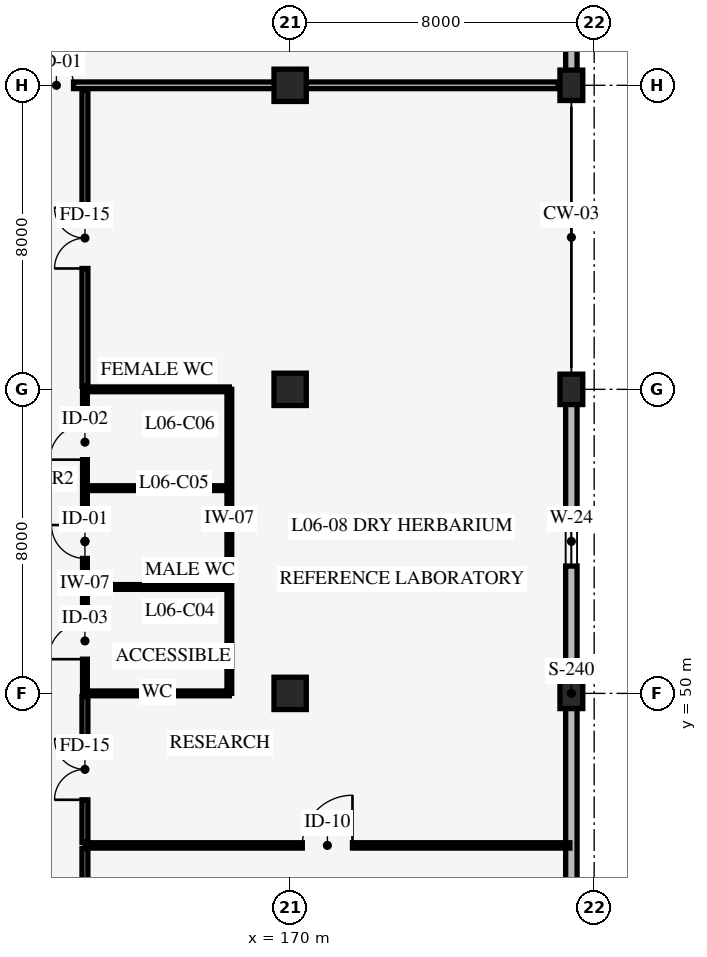
"""IFC4 building model, lengths in metres.
Left out: names, types, materials, properties, quantities, classifications, styles, units other than length and angle.
Written with IfcOpenShell. Run it as: python <this file> out.ifc"""

import sys

from ifc_helpers import new_model, si_unit, direction, frame, frame_2d, origin, origin_2d, place, context, subcontext, project, spatial, rectangle, extrude, element, fill, save


model = new_model("IFC4")
c1 = context("Model", 3, precision=1e-05, world=origin(), true_north=direction((0.0, 1.0)))
c2 = subcontext(c1, "Body", "Model", "MODEL_VIEW")
j1 = project(units=[si_unit("LENGTHUNIT", "METRE"), si_unit("PLANEANGLEUNIT", "RADIAN")], contexts=[c1])
p1 = place(None, origin())
s1 = spatial("IfcSite", under=j1, at=p1, CompositionType="ELEMENT")
p2 = place(p1, origin())
s2 = spatial("IfcBuilding", under=s1, at=p2, CompositionType="ELEMENT")
p3 = place(p2, frame((0.0, 0.0, 23.4)))
s3 = spatial("IfcBuildingStorey", under=s2, at=p3, CompositionType="ELEMENT", Elevation=23.4)
for number, where, z_axis, x_axis in (
    (1, (170.0, 50.0, 0.0), (0.0, 0.0, 1.0), (1.0, 0.0, 0.0)),
    (2, (170.0, 58.0, 0.0), (0.0, 0.0, 1.0), (1.0, 0.0, 0.0)),
    (3, (170.0, 66.0, 0.0), (0.0, 0.0, 1.0), (1.0, 0.0, 0.0)),
):
    element("IfcColumn", number, at=place(p3, frame(where, z_axis=z_axis, x_axis=x_axis)), inside=s3, PredefinedType="COLUMN", context=c2, shape_type="SweptSolid", body=[
        extrude(rectangle(XDim=0.85, YDim=0.85, at=origin_2d()), origin(), (0.0, 0.0, 1.0), 4.2),
    ])
for number, where, z_axis, x_axis in (
    (4, (177.4, 50.0, 0.0), (0.0, 0.0, 1.0), (1.0, 0.0, 0.0)),
    (5, (177.4, 58.0, 0.0), (0.0, 0.0, 1.0), (1.0, 0.0, 0.0)),
    (6, (177.4, 66.0, 0.0), (0.0, 0.0, 1.0), (1.0, 0.0, 0.0)),
):
    element("IfcColumn", number, at=place(p3, frame(where, z_axis=z_axis, x_axis=x_axis)), inside=s3, PredefinedType="COLUMN", context=c2, shape_type="SweptSolid", body=[
        extrude(rectangle(XDim=0.6, YDim=0.8, at=origin_2d()), origin(), (0.0, 0.0, 1.0), 4.2),
    ])
p4 = place(p3, frame((177.4, 74.0, 0.0), z_axis=(0.0, 0.0, 1.0), x_axis=(0.0, -1.0, 0.0)))
e7 = element("IfcWall", 7, at=p4, inside=s3, PredefinedType="STANDARD", context=c2, shape_type="SweptSolid", body=[
    extrude(rectangle(XDim=8.0, YDim=0.3, at=frame_2d((4.0, 0.0))), origin(), (0.0, 0.0, 1.0), 3.19),
])
p5 = place(p4, frame((3.15, 0.0, 0.85)))
e8 = element("IfcOpeningElement", 8, at=p5, cuts=e7, PredefinedType="OPENING", context=c2, shape_type="SweptSolid", body=[
    extrude(rectangle(XDim=1.7, YDim=1.2, at=frame_2d((0.85, 0.6))), frame((0.0, 0.16, 0.0), z_axis=(0.0, -1.0, 0.0), x_axis=(1.0, 0.0, 0.0)), (0.0, 0.0, 1.0), 0.32),
])
p6 = place(p3, frame((177.4, 58.0, 0.0), z_axis=(0.0, 0.0, 1.0), x_axis=(0.0, -1.0, 0.0)))
e9 = element("IfcWall", 9, at=p6, inside=s3, PredefinedType="STANDARD", context=c2, shape_type="SweptSolid", body=[
    extrude(rectangle(XDim=8.0, YDim=0.3, at=frame_2d((4.0, 0.0))), origin(), (0.0, 0.0, 1.0), 3.19),
])
p7 = place(p6, frame((3.35, 0.0, 0.85)))
e10 = element("IfcOpeningElement", 10, at=p7, cuts=e9, PredefinedType="OPENING", context=c2, shape_type="SweptSolid", body=[
    extrude(rectangle(XDim=1.3, YDim=1.7, at=frame_2d((0.65, 0.85))), frame((0.0, 0.16, 0.0), z_axis=(0.0, -1.0, 0.0), x_axis=(1.0, 0.0, 0.0)), (0.0, 0.0, 1.0), 0.32),
])
p8 = place(p3, frame((177.4, 50.0, 0.0), z_axis=(0.0, 0.0, 1.0), x_axis=(0.0, -1.0, 0.0)))
e11 = element("IfcWall", 11, at=p8, inside=s3, PredefinedType="STANDARD", context=c2, shape_type="SweptSolid", body=[
    extrude(rectangle(XDim=8.0, YDim=0.3, at=frame_2d((4.0, 0.0))), origin(), (0.0, 0.0, 1.0), 3.19),
])
p9 = place(p3, frame((164.6, 50.0, 0.0), z_axis=(0.0, 0.0, 1.0), x_axis=(0.0, 1.0, 0.0)))
e12 = element("IfcWall", 12, at=p9, inside=s3, PredefinedType="STANDARD", context=c2, shape_type="SweptSolid", body=[
    extrude(rectangle(XDim=8.0, YDim=0.125, at=frame_2d((4.0, 0.0))), origin(), (0.0, 0.0, 1.0), 3.9),
])
p10 = place(p9, frame((0.9, 0.0, 0.0)))
e13 = element("IfcOpeningElement", 13, at=p10, cuts=e12, PredefinedType="OPENING", context=c2, shape_type="SweptSolid", body=[
    extrude(rectangle(XDim=0.96, YDim=2.08, at=frame_2d((0.48, 1.04))), frame((0.0, 0.073, 0.0), z_axis=(0.0, -1.0, 0.0), x_axis=(1.0, 0.0, 0.0)), (0.0, 0.0, 1.0), 0.145),
])
p11 = place(p9, frame((3.55, 0.0, 0.0)))
e14 = element("IfcOpeningElement", 14, at=p11, cuts=e12, PredefinedType="OPENING", context=c2, shape_type="SweptSolid", body=[
    extrude(rectangle(XDim=0.88, YDim=2.05, at=frame_2d((0.44, 1.025))), frame((0.0, 0.073, 0.0), z_axis=(0.0, -1.0, 0.0), x_axis=(1.0, 0.0, 0.0)), (0.0, 0.0, 1.0), 0.145),
])
p12 = place(p9, frame((6.15, 0.0, 0.0)))
e15 = element("IfcOpeningElement", 15, at=p12, cuts=e12, PredefinedType="OPENING", context=c2, shape_type="SweptSolid", body=[
    extrude(rectangle(XDim=0.92, YDim=2.05, at=frame_2d((0.46, 1.025))), frame((0.0, 0.073, 0.0), z_axis=(0.0, -1.0, 0.0), x_axis=(1.0, 0.0, 0.0)), (0.0, 0.0, 1.0), 0.145),
])
p13 = place(p3, frame((168.4, 50.0, 0.0), z_axis=(0.0, 0.0, 1.0), x_axis=(0.0, 1.0, 0.0)))
e16 = element("IfcWall", 16, at=p13, inside=s3, PredefinedType="STANDARD", context=c2, shape_type="SweptSolid", body=[
    extrude(rectangle(XDim=8.0, YDim=0.125, at=frame_2d((4.0, 0.0))), origin(), (0.0, 0.0, 1.0), 3.9),
])
p14 = place(p3, frame((164.6, 50.0, 0.0), z_axis=(0.0, 0.0, 1.0), x_axis=(1.0, 0.0, 0.0)))
e17 = element("IfcWall", 17, at=p14, inside=s3, PredefinedType="STANDARD", context=c2, shape_type="SweptSolid", body=[
    extrude(rectangle(XDim=3.8, YDim=0.125, at=frame_2d((1.9, 0.0))), origin(), (0.0, 0.0, 1.0), 3.14),
])
for number, where, z_axis, x_axis in (
    (18, (164.6, 52.8, 0.0), (0.0, 0.0, 1.0), (1.0, 0.0, 0.0)),
    (19, (164.6, 55.4, 0.0), (0.0, 0.0, 1.0), (1.0, 0.0, 0.0)),
):
    element("IfcWall", number, at=place(p3, frame(where, z_axis=z_axis, x_axis=x_axis)), inside=s3, PredefinedType="STANDARD", context=c2, shape_type="SweptSolid", body=[
        extrude(rectangle(XDim=3.8, YDim=0.125, at=frame_2d((1.9, 0.0))), origin(), (0.0, 0.0, 1.0), 3.9),
    ])
p15 = place(p3, frame((164.6, 58.0, 0.0), z_axis=(0.0, 0.0, 1.0), x_axis=(1.0, 0.0, 0.0)))
e20 = element("IfcWall", 20, at=p15, inside=s3, PredefinedType="STANDARD", context=c2, shape_type="SweptSolid", body=[
    extrude(rectangle(XDim=3.8, YDim=0.125, at=frame_2d((1.9, 0.0))), origin(), (0.0, 0.0, 1.0), 3.14),
])
p16 = place(p3, frame((164.6, 34.12, 0.0), z_axis=(0.0, 0.0, 1.0), x_axis=(0.0, 1.0, 0.0)))
e21 = element("IfcWall", 21, at=p16, inside=s3, PredefinedType="STANDARD", context=c2, shape_type="SweptSolid", body=[
    extrude(rectangle(XDim=11.8, YDim=0.155, at=frame_2d((5.9, 0.0))), origin(), (0.0, 0.0, 1.0), 3.9),
])
p17 = place(p16, frame((5.125, 0.0, 0.0)))
e22 = element("IfcOpeningElement", 22, at=p17, cuts=e21, PredefinedType="OPENING", context=c2, shape_type="SweptSolid", body=[
    extrude(rectangle(XDim=1.55, YDim=2.25, at=frame_2d((0.775, 1.125))), frame((0.0, 0.087, 0.0), z_axis=(0.0, -1.0, 0.0), x_axis=(1.0, 0.0, 0.0)), (0.0, 0.0, 1.0), 0.175),
])
p18 = place(p3, frame((164.6, 46.0, 0.0), z_axis=(0.0, 0.0, 1.0), x_axis=(1.0, 0.0, 0.0)))
e23 = element("IfcWall", 23, at=p18, inside=s3, PredefinedType="STANDARD", context=c2, shape_type="SweptSolid", body=[
    extrude(rectangle(XDim=12.76, YDim=0.14, at=frame_2d((6.38, 0.0))), origin(), (0.0, 0.0, 1.0), 3.9),
])
p19 = place(p18, frame((5.72, 0.0, 0.0)))
e24 = element("IfcOpeningElement", 24, at=p19, cuts=e23, PredefinedType="OPENING", context=c2, shape_type="SweptSolid", body=[
    extrude(rectangle(XDim=1.32, YDim=2.16, at=frame_2d((0.66, 1.08))), frame((0.0, 0.08, 0.0), z_axis=(0.0, -1.0, 0.0), x_axis=(1.0, 0.0, 0.0)), (0.0, 0.0, 1.0), 0.16),
])
p20 = place(p3, frame((164.6, 46.08, 0.0), z_axis=(0.0, 0.0, 1.0), x_axis=(0.0, 1.0, 0.0)))
e25 = element("IfcWall", 25, at=p20, inside=s3, PredefinedType="STANDARD", context=c2, shape_type="SweptSolid", body=[
    extrude(rectangle(XDim=3.84, YDim=0.155, at=frame_2d((1.92, 0.0))), origin(), (0.0, 0.0, 1.0), 3.9),
])
p21 = place(p20, frame((1.12, 0.0, 0.0)))
e26 = element("IfcOpeningElement", 26, at=p21, cuts=e25, PredefinedType="OPENING", context=c2, shape_type="SweptSolid", body=[
    extrude(rectangle(XDim=1.6, YDim=2.25, at=frame_2d((0.8, 1.125))), frame((0.0, 0.087, 0.0), z_axis=(0.0, -1.0, 0.0), x_axis=(1.0, 0.0, 0.0)), (0.0, 0.0, 1.0), 0.175),
])
p22 = place(p3, frame((164.6, 58.08, 0.0), z_axis=(0.0, 0.0, 1.0), x_axis=(0.0, 1.0, 0.0)))
e27 = element("IfcWall", 27, at=p22, inside=s3, PredefinedType="STANDARD", context=c2, shape_type="SweptSolid", body=[
    extrude(rectangle(XDim=7.8, YDim=0.155, at=frame_2d((3.9, 0.0))), origin(), (0.0, 0.0, 1.0), 3.9),
])
p23 = place(p22, frame((3.1, 0.0, 0.0)))
e28 = element("IfcOpeningElement", 28, at=p23, cuts=e27, PredefinedType="OPENING", context=c2, shape_type="SweptSolid", body=[
    extrude(rectangle(XDim=1.6, YDim=2.25, at=frame_2d((0.8, 1.125))), frame((0.0, 0.087, 0.0), z_axis=(0.0, -1.0, 0.0), x_axis=(1.0, 0.0, 0.0)), (0.0, 0.0, 1.0), 0.175),
])
p24 = place(p3, frame((162.35, 66.0, 0.0), z_axis=(0.0, 0.0, 1.0), x_axis=(1.0, 0.0, 0.0)))
e29 = element("IfcWall", 29, at=p24, inside=s3, PredefinedType="STANDARD", context=c2, shape_type="SweptSolid", body=[
    extrude(rectangle(XDim=14.7, YDim=0.175, at=frame_2d((7.35, 0.0))), origin(), (0.0, 0.0, 1.0), 3.14),
])
p25 = place(p24, frame((1.05, 0.0, 0.0)))
e30 = element("IfcOpeningElement", 30, at=p25, cuts=e29, PredefinedType="OPENING", context=c2, shape_type="SweptSolid", body=[
    extrude(rectangle(XDim=0.9, YDim=2.1, at=frame_2d((0.45, 1.05))), frame((0.0, 0.098, 0.0), z_axis=(0.0, -1.0, 0.0), x_axis=(1.0, 0.0, 0.0)), (0.0, 0.0, 1.0), 0.195),
])
p26 = place(p7, origin())
e31 = element("IfcWindow", 31, at=p26, inside=s3, PartitioningType="SINGLE_PANEL", PredefinedType="WINDOW", context=c2, shape_type="SweptSolid", body=[
    extrude(rectangle(XDim=1.3, YDim=1.7, at=frame_2d((0.65, 0.85))), frame((0.0, 0.03, 0.0), z_axis=(0.0, -1.0, 0.0), x_axis=(1.0, 0.0, 0.0)), (0.0, 0.0, 1.0), 0.06),
])
fill(e10, e31)
p27 = place(p10, origin())
e32 = element("IfcDoor", 32, at=p27, inside=s3, OperationType="SINGLE_SWING_LEFT", PredefinedType="DOOR", context=c2, shape_type="SweptSolid", body=[
    extrude(rectangle(XDim=0.96, YDim=2.08, at=frame_2d((0.48, 1.04))), frame((0.0, 0.025, 0.0), z_axis=(0.0, -1.0, 0.0), x_axis=(1.0, 0.0, 0.0)), (0.0, 0.0, 1.0), 0.05),
])
fill(e13, e32)
p28 = place(p11, origin())
e33 = element("IfcDoor", 33, at=p28, inside=s3, OperationType="SINGLE_SWING_RIGHT", PredefinedType="DOOR", context=c2, shape_type="SweptSolid", body=[
    extrude(rectangle(XDim=0.88, YDim=2.05, at=frame_2d((0.44, 1.025))), frame((0.0, 0.025, 0.0), z_axis=(0.0, -1.0, 0.0), x_axis=(1.0, 0.0, 0.0)), (0.0, 0.0, 1.0), 0.05),
])
fill(e14, e33)
p29 = place(p12, origin())
e34 = element("IfcDoor", 34, at=p29, inside=s3, OperationType="SINGLE_SWING_LEFT", PredefinedType="DOOR", context=c2, shape_type="SweptSolid", body=[
    extrude(rectangle(XDim=0.92, YDim=2.05, at=frame_2d((0.46, 1.025))), frame((0.0, 0.025, 0.0), z_axis=(0.0, -1.0, 0.0), x_axis=(1.0, 0.0, 0.0)), (0.0, 0.0, 1.0), 0.05),
])
fill(e15, e34)
p30 = place(p19, origin())
e35 = element("IfcDoor", 35, at=p30, inside=s3, OperationType="SINGLE_SWING_RIGHT", PredefinedType="DOOR", context=c2, shape_type="SweptSolid", body=[
    extrude(rectangle(XDim=1.32, YDim=2.16, at=frame_2d((0.66, 1.08))), frame((0.0, 0.025, 0.0), z_axis=(0.0, -1.0, 0.0), x_axis=(1.0, 0.0, 0.0)), (0.0, 0.0, 1.0), 0.05),
])
fill(e24, e35)
p31 = place(p21, origin())
e36 = element("IfcDoor", 36, at=p31, inside=s3, OperationType="DOUBLE_DOOR_SINGLE_SWING", PredefinedType="DOOR", context=c2, shape_type="SweptSolid", body=[
    extrude(rectangle(XDim=1.6, YDim=2.25, at=frame_2d((0.8, 1.125))), frame((0.0, 0.025, 0.0), z_axis=(0.0, -1.0, 0.0), x_axis=(1.0, 0.0, 0.0)), (0.0, 0.0, 1.0), 0.05),
])
fill(e26, e36)
p32 = place(p23, origin())
e37 = element("IfcDoor", 37, at=p32, inside=s3, OperationType="DOUBLE_DOOR_SINGLE_SWING", PredefinedType="DOOR", context=c2, shape_type="SweptSolid", body=[
    extrude(rectangle(XDim=1.6, YDim=2.25, at=frame_2d((0.8, 1.125))), frame((0.0, 0.025, 0.0), z_axis=(0.0, -1.0, 0.0), x_axis=(1.0, 0.0, 0.0)), (0.0, 0.0, 1.0), 0.05),
])
fill(e28, e37)
p33 = place(p25, origin())
e38 = element("IfcDoor", 38, at=p33, inside=s3, OperationType="SINGLE_SWING_LEFT", PredefinedType="DOOR", context=c2, shape_type="SweptSolid", body=[
    extrude(rectangle(XDim=0.9, YDim=2.1, at=frame_2d((0.45, 1.05))), frame((0.0, 0.025, 0.0), z_axis=(0.0, -1.0, 0.0), x_axis=(1.0, 0.0, 0.0)), (0.0, 0.0, 1.0), 0.05),
])
fill(e30, e38)
save(model, sys.argv[1])
